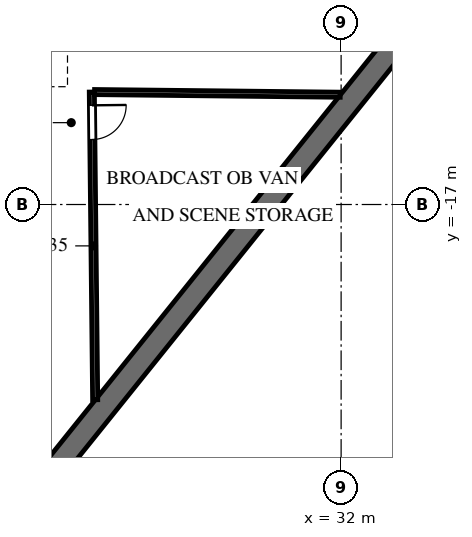
"""IFC4 building model, lengths in metres.
Left out: names, types, materials, properties, quantities, classifications, styles, units other than length and angle.
Written with IfcOpenShell. Run it as: python <this file> out.ifc"""

import sys

from ifc_helpers import new_model, si_unit, direction, frame, frame_2d, origin, place, context, subcontext, project, spatial, rectangle, extrude, source, transform, mapped, element, fill, save


model = new_model("IFC4")
c1 = context("Model", 3, precision=1e-05, world=origin(), true_north=direction((0.0, 1.0)))
c2 = subcontext(c1, "Body", "Model", "MODEL_VIEW")
j1 = project(units=[si_unit("LENGTHUNIT", "METRE"), si_unit("PLANEANGLEUNIT", "RADIAN")], contexts=[c1])
p1 = place(None, origin())
s1 = spatial("IfcSite", under=j1, at=p1, CompositionType="ELEMENT")
p2 = place(p1, origin())
s2 = spatial("IfcBuilding", under=s1, at=p2, CompositionType="ELEMENT")
p3 = place(p2, frame((0.0, 0.0, -5.0)))
s3 = spatial("IfcBuildingStorey", under=s2, at=p3, CompositionType="ELEMENT", Elevation=-5.0)
p4 = place(p3, frame((20.737, -28.59, 0.0), z_axis=(0.0, 0.0, 1.0), x_axis=(0.626280274315, 0.779597984864, 0.0)))
e1 = element("IfcWall", 1, at=p4, inside=s3, PredefinedType="USERDEFINED", context=c2, shape_type="SweptSolid", body=[
    extrude(rectangle(XDim=33.798, YDim=0.6, at=frame_2d((16.899, 0.0))), origin(), (0.0, 0.0, 1.0), 5.0),
])
p5 = place(p3, frame((25.44, -14.04, 0.0), z_axis=(0.0, 0.0, 1.0), x_axis=(0.010913484127, -0.999940446159, 0.0)))
e2 = element("IfcWall", 2, at=p5, inside=s3, PredefinedType="PARTITIONING", context=c2, shape_type="SweptSolid", body=[
    extrude(rectangle(XDim=8.098, YDim=0.135, at=frame_2d((4.049, 0.0))), origin(), (0.0, 0.0, 1.0), 4.685),
])
p6 = place(p5, frame((0.35, 0.0, 0.0)))
e3 = element("IfcOpeningElement", 3, at=p6, cuts=e2, PredefinedType="OPENING", context=c2, shape_type="SweptSolid", body=[
    extrude(rectangle(XDim=0.9, YDim=2.05, at=frame_2d((0.45, 1.025))), frame((0.0, 0.078, 0.0), z_axis=(0.0, -1.0, 0.0), x_axis=(1.0, 0.0, 0.0)), (0.0, 0.0, 1.0), 0.155),
])
p7 = place(p3, frame((31.977, -14.111, 0.0), z_axis=(0.0, 0.0, 1.0), x_axis=(-0.999940864579, 0.010875079076, 0.0)))
e4 = element("IfcWall", 4, at=p7, inside=s3, PredefinedType="PARTITIONING", context=c2, shape_type="SweptSolid", body=[
    extrude(rectangle(XDim=6.466, YDim=0.135, at=frame_2d((3.233, 0.0))), origin(), (0.0, 0.0, 1.0), 4.685),
])
m1 = source(origin(), c2, "Body", "SweptSolid", [
    extrude(rectangle(XDim=0.9, YDim=2.05, at=frame_2d((0.45, 1.025))), frame((0.0, 0.025, 0.0), z_axis=(0.0, -1.0, 0.0), x_axis=(1.0, 0.0, 0.0)), (0.0, 0.0, 1.0), 0.05),
])
p8 = place(p6, origin())
e5 = element("IfcDoor", 5, at=p8, inside=s3, OperationType="SINGLE_SWING_LEFT", PredefinedType="DOOR", context=c2, shape_type="MappedRepresentation", body=[
    mapped(m1, transform((0.0, 0.0, 0.0), x_axis=(1.0, 0.0, 0.0), y_axis=(0.0, 1.0, 0.0), z_axis=(0.0, 0.0, 1.0), scale=1.0)),
])
fill(e3, e5)
save(model, sys.argv[1])
